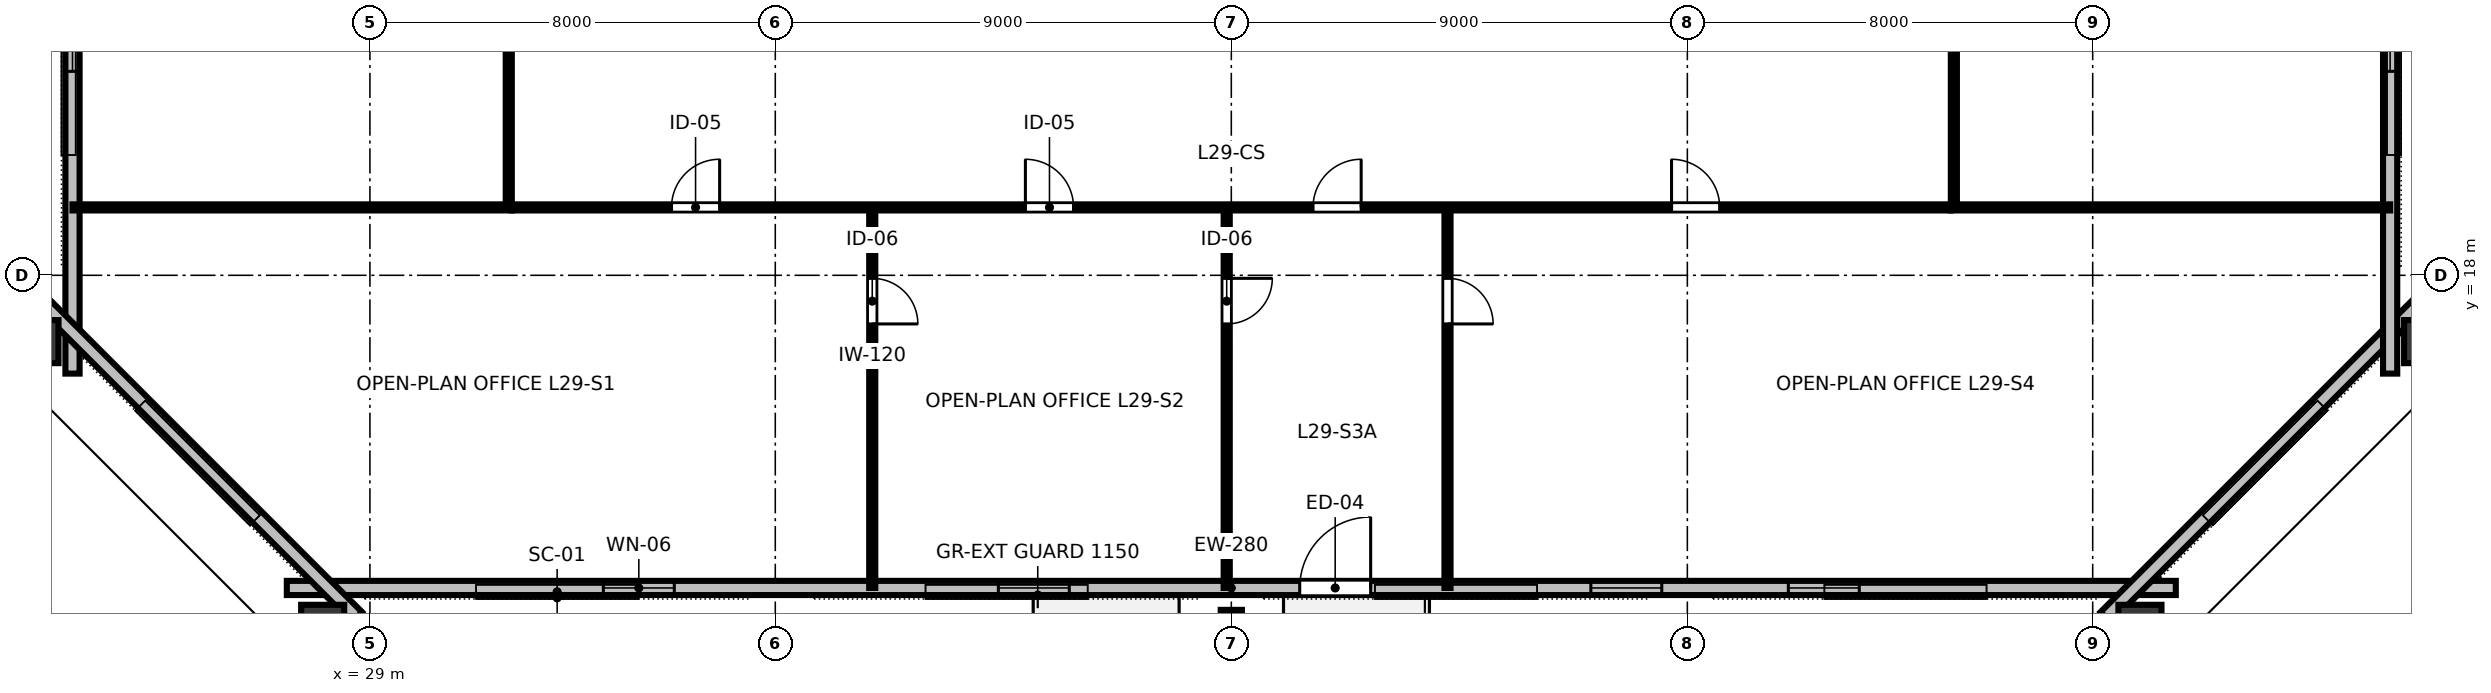
"""IFC4 building model, lengths in metres.
Left out: names, types, materials, properties, quantities, classifications, styles, units other than length and angle.
Written with IfcOpenShell. Run it as: python <this file> out.ifc"""

import sys

from ifc_helpers import new_model, si_unit, direction, frame, frame_2d, origin, origin_2d, place, context, subcontext, project, spatial, rectangle, hollow_rectangle, i_section, extrude, element, fill, save


model = new_model("IFC4")
c1 = context("Model", 3, precision=1e-05, world=origin(), true_north=direction((0.0, 1.0)))
c2 = subcontext(c1, "Body", "Model", "MODEL_VIEW")
j1 = project(units=[si_unit("LENGTHUNIT", "METRE"), si_unit("PLANEANGLEUNIT", "RADIAN")], contexts=[c1])
p1 = place(None, origin())
s1 = spatial("IfcSite", under=j1, at=p1, CompositionType="ELEMENT")
p2 = place(p1, origin())
s2 = spatial("IfcBuilding", under=s1, at=p2, CompositionType="ELEMENT")
p3 = place(p2, frame((0.0, 0.0, 113.2)))
s3 = spatial("IfcBuildingStorey", under=s2, at=p3, CompositionType="ELEMENT", Elevation=113.2)
p4 = place(p3, frame((28.067, 10.998, 0.0), z_axis=(0.227500403072, 0.158558770333, 0.960782328601), x_axis=(-0.571787524267, 0.820401747373, 0.0)))
e1 = element("IfcColumn", 1, at=p4, inside=s3, PredefinedType="COLUMN", context=c2, shape_type="SweptSolid", body=[
    extrude(hollow_rectangle(XDim=0.85, YDim=1.0, WallThickness=0.05, at=origin_2d()), origin(), (0.0, 0.0, 1.0), 3.495),
])
p5 = place(p3, frame((46.0, 11.17, 0.0), z_axis=(0.0, 0.161641018094, 0.986849624446), x_axis=(-1.0, 0.0, 0.0)))
e2 = element("IfcColumn", 2, at=p5, inside=s3, PredefinedType="COLUMN", context=c2, shape_type="SweptSolid", body=[
    extrude(i_section(OverallWidth=0.418, OverallDepth=0.455, WebThickness=0.042, FlangeThickness=0.068, FilletRadius=0.025, at=origin_2d()), origin(), (0.0, 0.0, 1.0), 3.403),
])
p6 = place(p3, frame((63.933, 10.998, 0.0), z_axis=(-0.227500403072, 0.158558770333, 0.960782328601), x_axis=(-0.571787524267, -0.820401747373, 0.0)))
e3 = element("IfcColumn", 3, at=p6, inside=s3, PredefinedType="COLUMN", context=c2, shape_type="SweptSolid", body=[
    extrude(hollow_rectangle(XDim=0.85, YDim=1.0, WallThickness=0.05, at=origin_2d()), origin(), (0.0, 0.0, 1.0), 3.495),
])
for number, where, z_axis, x_axis in (
    (4, (69.646, 16.691, 0.0), (-0.187, 0.199, 0.962), (0.659, -0.701, 0.273)),
    (5, (22.354, 16.691, 0.0), (0.187, 0.199, 0.962), (-0.659, -0.701, 0.273)),
):
    element("IfcColumn", number, at=place(p3, frame(where, z_axis=z_axis, x_axis=x_axis)), inside=s3, PredefinedType="COLUMN", context=c2, shape_type="SweptSolid", body=[
        extrude(hollow_rectangle(XDim=0.85, YDim=1.0, WallThickness=0.05, at=origin_2d()), origin(), (0.0, 0.0, 1.0), 3.491),
    ])
p7 = place(p3, frame((27.36, 11.83, 0.0), z_axis=(0.0, 0.0, 1.0), x_axis=(1.0, 0.0, 0.0)))
e6 = element("IfcWall", 6, at=p7, inside=s3, PredefinedType="STANDARD", context=c2, shape_type="SweptSolid", body=[
    extrude(rectangle(XDim=37.28, YDim=0.28, at=frame_2d((18.64, 0.0))), origin(), (0.0, 0.0, 1.0), 2.662),
])
p8 = place(p7, frame((19.99, 0.0, 0.0)))
e7 = element("IfcOpeningElement", 7, at=p8, cuts=e6, PredefinedType="OPENING", context=c2, shape_type="SweptSolid", body=[
    extrude(rectangle(XDim=1.4, YDim=2.15, at=frame_2d((0.7, 1.075))), frame((0.0, 0.15, 0.0), z_axis=(0.0, -1.0, 0.0), x_axis=(1.0, 0.0, 0.0)), (0.0, 0.0, 1.0), 0.3),
])
p9 = place(p7, frame((6.247, 0.0, 0.85)))
e8 = element("IfcOpeningElement", 8, at=p9, cuts=e6, PredefinedType="OPENING", context=c2, shape_type="SweptSolid", body=[
    extrude(rectangle(XDim=1.4, YDim=1.2, at=frame_2d((0.7, 0.6))), frame((0.0, 0.15, 0.0), z_axis=(0.0, -1.0, 0.0), x_axis=(1.0, 0.0, 0.0)), (0.0, 0.0, 1.0), 0.3),
])
p10 = place(p7, frame((14.042, 0.0, 0.85)))
e9 = element("IfcOpeningElement", 9, at=p10, cuts=e6, PredefinedType="OPENING", context=c2, shape_type="SweptSolid", body=[
    extrude(rectangle(XDim=1.4, YDim=1.2, at=frame_2d((0.7, 0.6))), frame((0.0, 0.15, 0.0), z_axis=(0.0, -1.0, 0.0), x_axis=(1.0, 0.0, 0.0)), (0.0, 0.0, 1.0), 0.3),
])
p11 = place(p7, frame((25.736, 0.0, 0.85)))
e10 = element("IfcOpeningElement", 10, at=p11, cuts=e6, PredefinedType="OPENING", context=c2, shape_type="SweptSolid", body=[
    extrude(rectangle(XDim=1.4, YDim=1.2, at=frame_2d((0.7, 0.6))), frame((0.0, 0.15, 0.0), z_axis=(0.0, -1.0, 0.0), x_axis=(1.0, 0.0, 0.0)), (0.0, 0.0, 1.0), 0.3),
])
p12 = place(p7, frame((29.633, 0.0, 0.85)))
e11 = element("IfcOpeningElement", 11, at=p12, cuts=e6, PredefinedType="OPENING", context=c2, shape_type="SweptSolid", body=[
    extrude(rectangle(XDim=1.4, YDim=1.2, at=frame_2d((0.7, 0.6))), frame((0.0, 0.15, 0.0), z_axis=(0.0, -1.0, 0.0), x_axis=(1.0, 0.0, 0.0)), (0.0, 0.0, 1.0), 0.3),
])
p13 = place(p3, frame((63.254, 11.256, 0.0), z_axis=(0.0, 0.0, 1.0), x_axis=(0.707106781187, 0.707106781187, 0.0)))
e12 = element("IfcWall", 12, at=p13, inside=s3, PredefinedType="STANDARD", context=c2, shape_type="SweptSolid", body=[
    extrude(rectangle(XDim=8.753, YDim=0.28, at=frame_2d((4.376, 0.0))), origin(), (0.0, 0.0, 1.0), 2.662),
])
p14 = place(p3, frame((68.87, 16.06, 0.0), z_axis=(0.0, 0.0, 1.0), x_axis=(0.0, 1.0, 0.0)))
e13 = element("IfcWall", 13, at=p14, inside=s3, PredefinedType="STANDARD", context=c2, shape_type="SweptSolid", body=[
    extrude(rectangle(XDim=31.88, YDim=0.28, at=frame_2d((15.94, 0.0))), origin(), (0.0, 0.0, 1.0), 2.662),
])
p15 = place(p14, frame((5.965, 0.0, 0.85)))
e14 = element("IfcOpeningElement", 14, at=p15, cuts=e13, PredefinedType="OPENING", context=c2, shape_type="SweptSolid", body=[
    extrude(rectangle(XDim=1.4, YDim=1.2, at=frame_2d((0.7, 0.6))), frame((0.0, 0.15, 0.0), z_axis=(0.0, -1.0, 0.0), x_axis=(1.0, 0.0, 0.0)), (0.0, 0.0, 1.0), 0.3),
])
p16 = place(p14, frame((9.675, 0.0, 0.85)))
e15 = element("IfcOpeningElement", 15, at=p16, cuts=e13, PredefinedType="OPENING", context=c2, shape_type="SweptSolid", body=[
    extrude(rectangle(XDim=1.4, YDim=1.2, at=frame_2d((0.7, 0.6))), frame((0.0, 0.15, 0.0), z_axis=(0.0, -1.0, 0.0), x_axis=(1.0, 0.0, 0.0)), (0.0, 0.0, 1.0), 0.3),
])
p17 = place(p14, frame((13.385, 0.0, 0.85)))
e16 = element("IfcOpeningElement", 16, at=p17, cuts=e13, PredefinedType="OPENING", context=c2, shape_type="SweptSolid", body=[
    extrude(rectangle(XDim=1.4, YDim=1.2, at=frame_2d((0.7, 0.6))), frame((0.0, 0.15, 0.0), z_axis=(0.0, -1.0, 0.0), x_axis=(1.0, 0.0, 0.0)), (0.0, 0.0, 1.0), 0.3),
])
p18 = place(p14, frame((20.805, 0.0, 0.85)))
e17 = element("IfcOpeningElement", 17, at=p18, cuts=e13, PredefinedType="OPENING", context=c2, shape_type="SweptSolid", body=[
    extrude(rectangle(XDim=1.4, YDim=1.2, at=frame_2d((0.7, 0.6))), frame((0.0, 0.15, 0.0), z_axis=(0.0, -1.0, 0.0), x_axis=(1.0, 0.0, 0.0)), (0.0, 0.0, 1.0), 0.3),
])
p19 = place(p14, frame((24.515, 0.0, 0.85)))
e18 = element("IfcOpeningElement", 18, at=p19, cuts=e13, PredefinedType="OPENING", context=c2, shape_type="SweptSolid", body=[
    extrude(rectangle(XDim=1.4, YDim=1.2, at=frame_2d((0.7, 0.6))), frame((0.0, 0.15, 0.0), z_axis=(0.0, -1.0, 0.0), x_axis=(1.0, 0.0, 0.0)), (0.0, 0.0, 1.0), 0.3),
])
p20 = place(p3, frame((23.13, 47.94, 0.0), z_axis=(0.0, 0.0, 1.0), x_axis=(0.0, -1.0, 0.0)))
e19 = element("IfcWall", 19, at=p20, inside=s3, PredefinedType="STANDARD", context=c2, shape_type="SweptSolid", body=[
    extrude(rectangle(XDim=31.88, YDim=0.28, at=frame_2d((15.94, 0.0))), origin(), (0.0, 0.0, 1.0), 2.662),
])
p21 = place(p20, frame((5.965, 0.0, 0.85)))
e20 = element("IfcOpeningElement", 20, at=p21, cuts=e19, PredefinedType="OPENING", context=c2, shape_type="SweptSolid", body=[
    extrude(rectangle(XDim=1.4, YDim=1.2, at=frame_2d((0.7, 0.6))), frame((0.0, 0.15, 0.0), z_axis=(0.0, -1.0, 0.0), x_axis=(1.0, 0.0, 0.0)), (0.0, 0.0, 1.0), 0.3),
])
p22 = place(p20, frame((9.675, 0.0, 0.85)))
e21 = element("IfcOpeningElement", 21, at=p22, cuts=e19, PredefinedType="OPENING", context=c2, shape_type="SweptSolid", body=[
    extrude(rectangle(XDim=1.4, YDim=1.2, at=frame_2d((0.7, 0.6))), frame((0.0, 0.15, 0.0), z_axis=(0.0, -1.0, 0.0), x_axis=(1.0, 0.0, 0.0)), (0.0, 0.0, 1.0), 0.3),
])
p23 = place(p20, frame((13.385, 0.0, 0.85)))
e22 = element("IfcOpeningElement", 22, at=p23, cuts=e19, PredefinedType="OPENING", context=c2, shape_type="SweptSolid", body=[
    extrude(rectangle(XDim=1.4, YDim=1.2, at=frame_2d((0.7, 0.6))), frame((0.0, 0.15, 0.0), z_axis=(0.0, -1.0, 0.0), x_axis=(1.0, 0.0, 0.0)), (0.0, 0.0, 1.0), 0.3),
])
p24 = place(p20, frame((17.095, 0.0, 0.85)))
e23 = element("IfcOpeningElement", 23, at=p24, cuts=e19, PredefinedType="OPENING", context=c2, shape_type="SweptSolid", body=[
    extrude(rectangle(XDim=1.4, YDim=1.2, at=frame_2d((0.7, 0.6))), frame((0.0, 0.15, 0.0), z_axis=(0.0, -1.0, 0.0), x_axis=(1.0, 0.0, 0.0)), (0.0, 0.0, 1.0), 0.3),
])
p25 = place(p20, frame((20.805, 0.0, 0.85)))
e24 = element("IfcOpeningElement", 24, at=p25, cuts=e19, PredefinedType="OPENING", context=c2, shape_type="SweptSolid", body=[
    extrude(rectangle(XDim=1.4, YDim=1.2, at=frame_2d((0.7, 0.6))), frame((0.0, 0.15, 0.0), z_axis=(0.0, -1.0, 0.0), x_axis=(1.0, 0.0, 0.0)), (0.0, 0.0, 1.0), 0.3),
])
p26 = place(p20, frame((24.515, 0.0, 0.85)))
e25 = element("IfcOpeningElement", 25, at=p26, cuts=e19, PredefinedType="OPENING", context=c2, shape_type="SweptSolid", body=[
    extrude(rectangle(XDim=1.4, YDim=1.2, at=frame_2d((0.7, 0.6))), frame((0.0, 0.15, 0.0), z_axis=(0.0, -1.0, 0.0), x_axis=(1.0, 0.0, 0.0)), (0.0, 0.0, 1.0), 0.3),
])
p27 = place(p3, frame((22.556, 17.446, 0.0), z_axis=(0.0, 0.0, 1.0), x_axis=(0.707106781187, -0.707106781187, 0.0)))
e26 = element("IfcWall", 26, at=p27, inside=s3, PredefinedType="STANDARD", context=c2, shape_type="SweptSolid", body=[
    extrude(rectangle(XDim=8.753, YDim=0.28, at=frame_2d((4.376, 0.0))), origin(), (0.0, 0.0, 1.0), 2.662),
])
p28 = place(p3, frame((38.914, 19.34, 0.0), z_axis=(0.0, 0.0, 1.0), x_axis=(0.0, -1.0, 0.0)))
e27 = element("IfcWall", 27, at=p28, inside=s3, PredefinedType="PARTITIONING", context=c2, shape_type="SweptSolid", body=[
    extrude(rectangle(XDim=7.51, YDim=0.12, at=frame_2d((3.755, 0.0))), origin(), (0.0, 0.0, 1.0), 2.64),
])
p29 = place(p28, frame((1.4, 0.0, 0.0)))
e28 = element("IfcOpeningElement", 28, at=p29, cuts=e27, PredefinedType="OPENING", context=c2, shape_type="SweptSolid", body=[
    extrude(rectangle(XDim=0.9, YDim=2.15, at=frame_2d((0.45, 1.075))), frame((0.0, 0.07, 0.0), z_axis=(0.0, -1.0, 0.0), x_axis=(1.0, 0.0, 0.0)), (0.0, 0.0, 1.0), 0.14),
])
p30 = place(p3, frame((45.909, 19.34, 0.0), z_axis=(0.0, 0.0, 1.0), x_axis=(0.0, -1.0, 0.0)))
e29 = element("IfcWall", 29, at=p30, inside=s3, PredefinedType="PARTITIONING", context=c2, shape_type="SweptSolid", body=[
    extrude(rectangle(XDim=7.51, YDim=0.12, at=frame_2d((3.755, 0.0))), origin(), (0.0, 0.0, 1.0), 2.64),
])
p31 = place(p30, frame((1.4, 0.0, 0.0)))
e30 = element("IfcOpeningElement", 30, at=p31, cuts=e29, PredefinedType="OPENING", context=c2, shape_type="SweptSolid", body=[
    extrude(rectangle(XDim=0.9, YDim=2.15, at=frame_2d((0.45, 1.075))), frame((0.0, 0.07, 0.0), z_axis=(0.0, -1.0, 0.0), x_axis=(1.0, 0.0, 0.0)), (0.0, 0.0, 1.0), 0.14),
])
p32 = place(p3, frame((50.267, 19.34, 0.0), z_axis=(0.0, 0.0, 1.0), x_axis=(0.0, -1.0, 0.0)))
e31 = element("IfcWall", 31, at=p32, inside=s3, PredefinedType="PARTITIONING", context=c2, shape_type="SweptSolid", body=[
    extrude(rectangle(XDim=7.51, YDim=0.12, at=frame_2d((3.755, 0.0))), origin(), (0.0, 0.0, 1.0), 2.64),
])
p33 = place(p32, frame((1.4, 0.0, 0.0)))
e32 = element("IfcOpeningElement", 32, at=p33, cuts=e31, PredefinedType="OPENING", context=c2, shape_type="SweptSolid", body=[
    extrude(rectangle(XDim=0.9, YDim=2.15, at=frame_2d((0.45, 1.075))), frame((0.0, 0.07, 0.0), z_axis=(0.0, -1.0, 0.0), x_axis=(1.0, 0.0, 0.0)), (0.0, 0.0, 1.0), 0.14),
])
p34 = place(p3, frame((31.8, 19.34, 0.0), z_axis=(0.0, 0.0, 1.0), x_axis=(1.0, 0.0, 0.0)))
e33 = element("IfcWall", 33, at=p34, inside=s3, PredefinedType="PARTITIONING", context=c2, shape_type="SweptSolid", body=[
    extrude(rectangle(XDim=28.4, YDim=0.12, at=frame_2d((14.2, 0.0))), origin(), (0.0, 0.0, 1.0), 2.64),
])
p35 = place(p34, frame((3.152, 0.0, 0.0)))
e34 = element("IfcOpeningElement", 34, at=p35, cuts=e33, PredefinedType="OPENING", context=c2, shape_type="SweptSolid", body=[
    extrude(rectangle(XDim=0.95, YDim=2.15, at=frame_2d((0.475, 1.075))), frame((0.0, 0.07, 0.0), z_axis=(0.0, -1.0, 0.0), x_axis=(1.0, 0.0, 0.0)), (0.0, 0.0, 1.0), 0.14),
])
p36 = place(p34, frame((10.136, 0.0, 0.0)))
e35 = element("IfcOpeningElement", 35, at=p36, cuts=e33, PredefinedType="OPENING", context=c2, shape_type="SweptSolid", body=[
    extrude(rectangle(XDim=0.95, YDim=2.15, at=frame_2d((0.475, 1.075))), frame((0.0, 0.07, 0.0), z_axis=(0.0, -1.0, 0.0), x_axis=(1.0, 0.0, 0.0)), (0.0, 0.0, 1.0), 0.14),
])
p37 = place(p34, frame((15.813, 0.0, 0.0)))
e36 = element("IfcOpeningElement", 36, at=p37, cuts=e33, PredefinedType="OPENING", context=c2, shape_type="SweptSolid", body=[
    extrude(rectangle(XDim=0.95, YDim=2.15, at=frame_2d((0.475, 1.075))), frame((0.0, 0.07, 0.0), z_axis=(0.0, -1.0, 0.0), x_axis=(1.0, 0.0, 0.0)), (0.0, 0.0, 1.0), 0.14),
])
p38 = place(p34, frame((22.888, 0.0, 0.0)))
e37 = element("IfcOpeningElement", 37, at=p38, cuts=e33, PredefinedType="OPENING", context=c2, shape_type="SweptSolid", body=[
    extrude(rectangle(XDim=0.95, YDim=2.15, at=frame_2d((0.475, 1.075))), frame((0.0, 0.07, 0.0), z_axis=(0.0, -1.0, 0.0), x_axis=(1.0, 0.0, 0.0)), (0.0, 0.0, 1.0), 0.14),
])
p39 = place(p3, frame((31.74, 19.4, 0.0), z_axis=(0.0, 0.0, 1.0), x_axis=(0.0, 1.0, 0.0)))
e38 = element("IfcWall", 38, at=p39, inside=s3, PredefinedType="PARTITIONING", context=c2, shape_type="SweptSolid", body=[
    extrude(rectangle(XDim=11.58, YDim=0.12, at=frame_2d((5.79, 0.0))), origin(), (0.0, 0.0, 1.0), 2.64),
])
p40 = place(p39, frame((5.415, 0.0, 0.0)))
e39 = element("IfcOpeningElement", 39, at=p40, cuts=e38, PredefinedType="OPENING", context=c2, shape_type="SweptSolid", body=[
    extrude(rectangle(XDim=0.95, YDim=2.15, at=frame_2d((0.475, 1.075))), frame((0.0, 0.07, 0.0), z_axis=(0.0, -1.0, 0.0), x_axis=(1.0, 0.0, 0.0)), (0.0, 0.0, 1.0), 0.14),
])
p41 = place(p3, frame((60.26, 19.4, 0.0), z_axis=(0.0, 0.0, 1.0), x_axis=(0.0, 1.0, 0.0)))
e40 = element("IfcWall", 40, at=p41, inside=s3, PredefinedType="PARTITIONING", context=c2, shape_type="SweptSolid", body=[
    extrude(rectangle(XDim=11.58, YDim=0.12, at=frame_2d((5.79, 0.0))), origin(), (0.0, 0.0, 1.0), 2.64),
])
p42 = place(p41, frame((5.415, 0.0, 0.0)))
e41 = element("IfcOpeningElement", 41, at=p42, cuts=e40, PredefinedType="OPENING", context=c2, shape_type="SweptSolid", body=[
    extrude(rectangle(XDim=0.95, YDim=2.15, at=frame_2d((0.475, 1.075))), frame((0.0, 0.07, 0.0), z_axis=(0.0, -1.0, 0.0), x_axis=(1.0, 0.0, 0.0)), (0.0, 0.0, 1.0), 0.14),
])
for number, where, z_axis, x_axis in (
    (42, (31.8, 19.34, 0.0), (0.0, 0.0, 1.0), (-1.0, 0.0, 0.0)),
    (43, (60.2, 19.34, 0.0), (0.0, 0.0, 1.0), (1.0, 0.0, 0.0)),
):
    element("IfcWall", number, at=place(p3, frame(where, z_axis=z_axis, x_axis=x_axis)), inside=s3, PredefinedType="PARTITIONING", context=c2, shape_type="SweptSolid", body=[
        extrude(rectangle(XDim=8.67, YDim=0.12, at=frame_2d((4.335, 0.0))), origin(), (0.0, 0.0, 1.0), 2.64),
    ])
p43 = place(p8, origin())
e44 = element("IfcDoor", 44, at=p43, inside=s3, OperationType="SINGLE_SWING_RIGHT", PredefinedType="DOOR", context=c2, shape_type="SweptSolid", body=[
    extrude(rectangle(XDim=1.4, YDim=2.15, at=frame_2d((0.7, 1.075))), frame((0.0, 0.025, 0.0), z_axis=(0.0, -1.0, 0.0), x_axis=(1.0, 0.0, 0.0)), (0.0, 0.0, 1.0), 0.05),
])
fill(e7, e44)
p44 = place(p9, origin())
e45 = element("IfcWindow", 45, at=p44, inside=s3, PartitioningType="SINGLE_PANEL", PredefinedType="WINDOW", context=c2, shape_type="SweptSolid", body=[
    extrude(rectangle(XDim=1.4, YDim=1.2, at=frame_2d((0.7, 0.6))), frame((0.0, 0.03, 0.0), z_axis=(0.0, -1.0, 0.0), x_axis=(1.0, 0.0, 0.0)), (0.0, 0.0, 1.0), 0.06),
])
fill(e8, e45)
p45 = place(p10, origin())
e46 = element("IfcWindow", 46, at=p45, inside=s3, PartitioningType="SINGLE_PANEL", PredefinedType="WINDOW", context=c2, shape_type="SweptSolid", body=[
    extrude(rectangle(XDim=1.4, YDim=1.2, at=frame_2d((0.7, 0.6))), frame((0.0, 0.03, 0.0), z_axis=(0.0, -1.0, 0.0), x_axis=(1.0, 0.0, 0.0)), (0.0, 0.0, 1.0), 0.06),
])
fill(e9, e46)
p46 = place(p11, origin())
e47 = element("IfcWindow", 47, at=p46, inside=s3, PartitioningType="SINGLE_PANEL", PredefinedType="WINDOW", context=c2, shape_type="SweptSolid", body=[
    extrude(rectangle(XDim=1.4, YDim=1.2, at=frame_2d((0.7, 0.6))), frame((0.0, 0.03, 0.0), z_axis=(0.0, -1.0, 0.0), x_axis=(1.0, 0.0, 0.0)), (0.0, 0.0, 1.0), 0.06),
])
fill(e10, e47)
p47 = place(p12, origin())
e48 = element("IfcWindow", 48, at=p47, inside=s3, PartitioningType="SINGLE_PANEL", PredefinedType="WINDOW", context=c2, shape_type="SweptSolid", body=[
    extrude(rectangle(XDim=1.4, YDim=1.2, at=frame_2d((0.7, 0.6))), frame((0.0, 0.03, 0.0), z_axis=(0.0, -1.0, 0.0), x_axis=(1.0, 0.0, 0.0)), (0.0, 0.0, 1.0), 0.06),
])
fill(e11, e48)
p48 = place(p15, origin())
e49 = element("IfcWindow", 49, at=p48, inside=s3, PartitioningType="SINGLE_PANEL", PredefinedType="WINDOW", context=c2, shape_type="SweptSolid", body=[
    extrude(rectangle(XDim=1.4, YDim=1.2, at=frame_2d((0.7, 0.6))), frame((0.0, 0.03, 0.0), z_axis=(0.0, -1.0, 0.0), x_axis=(1.0, 0.0, 0.0)), (0.0, 0.0, 1.0), 0.06),
])
fill(e14, e49)
p49 = place(p26, origin())
e50 = element("IfcWindow", 50, at=p49, inside=s3, PartitioningType="SINGLE_PANEL", PredefinedType="WINDOW", context=c2, shape_type="SweptSolid", body=[
    extrude(rectangle(XDim=1.4, YDim=1.2, at=frame_2d((0.7, 0.6))), frame((0.0, 0.03, 0.0), z_axis=(0.0, -1.0, 0.0), x_axis=(1.0, 0.0, 0.0)), (0.0, 0.0, 1.0), 0.06),
])
fill(e25, e50)
p50 = place(p29, origin())
e51 = element("IfcDoor", 51, at=p50, inside=s3, OperationType="SINGLE_SWING_RIGHT", PredefinedType="DOOR", context=c2, shape_type="SweptSolid", body=[
    extrude(rectangle(XDim=0.9, YDim=2.15, at=frame_2d((0.45, 1.075))), frame((0.0, 0.025, 0.0), z_axis=(0.0, -1.0, 0.0), x_axis=(1.0, 0.0, 0.0)), (0.0, 0.0, 1.0), 0.05),
])
fill(e28, e51)
p51 = place(p31, origin())
e52 = element("IfcDoor", 52, at=p51, inside=s3, OperationType="SINGLE_SWING_LEFT", PredefinedType="DOOR", context=c2, shape_type="SweptSolid", body=[
    extrude(rectangle(XDim=0.9, YDim=2.15, at=frame_2d((0.45, 1.075))), frame((0.0, 0.025, 0.0), z_axis=(0.0, -1.0, 0.0), x_axis=(1.0, 0.0, 0.0)), (0.0, 0.0, 1.0), 0.05),
])
fill(e30, e52)
p52 = place(p33, origin())
e53 = element("IfcDoor", 53, at=p52, inside=s3, OperationType="SINGLE_SWING_RIGHT", PredefinedType="DOOR", context=c2, shape_type="SweptSolid", body=[
    extrude(rectangle(XDim=0.9, YDim=2.15, at=frame_2d((0.45, 1.075))), frame((0.0, 0.025, 0.0), z_axis=(0.0, -1.0, 0.0), x_axis=(1.0, 0.0, 0.0)), (0.0, 0.0, 1.0), 0.05),
])
fill(e32, e53)
p53 = place(p35, origin())
e54 = element("IfcDoor", 54, at=p53, inside=s3, OperationType="SINGLE_SWING_RIGHT", PredefinedType="DOOR", context=c2, shape_type="SweptSolid", body=[
    extrude(rectangle(XDim=0.95, YDim=2.15, at=frame_2d((0.475, 1.075))), frame((0.0, 0.025, 0.0), z_axis=(0.0, -1.0, 0.0), x_axis=(1.0, 0.0, 0.0)), (0.0, 0.0, 1.0), 0.05),
])
fill(e34, e54)
p54 = place(p36, origin())
e55 = element("IfcDoor", 55, at=p54, inside=s3, OperationType="SINGLE_SWING_LEFT", PredefinedType="DOOR", context=c2, shape_type="SweptSolid", body=[
    extrude(rectangle(XDim=0.95, YDim=2.15, at=frame_2d((0.475, 1.075))), frame((0.0, 0.025, 0.0), z_axis=(0.0, -1.0, 0.0), x_axis=(1.0, 0.0, 0.0)), (0.0, 0.0, 1.0), 0.05),
])
fill(e35, e55)
p55 = place(p37, origin())
e56 = element("IfcDoor", 56, at=p55, inside=s3, OperationType="SINGLE_SWING_RIGHT", PredefinedType="DOOR", context=c2, shape_type="SweptSolid", body=[
    extrude(rectangle(XDim=0.95, YDim=2.15, at=frame_2d((0.475, 1.075))), frame((0.0, 0.025, 0.0), z_axis=(0.0, -1.0, 0.0), x_axis=(1.0, 0.0, 0.0)), (0.0, 0.0, 1.0), 0.05),
])
fill(e36, e56)
p56 = place(p38, origin())
e57 = element("IfcDoor", 57, at=p56, inside=s3, OperationType="SINGLE_SWING_LEFT", PredefinedType="DOOR", context=c2, shape_type="SweptSolid", body=[
    extrude(rectangle(XDim=0.95, YDim=2.15, at=frame_2d((0.475, 1.075))), frame((0.0, 0.025, 0.0), z_axis=(0.0, -1.0, 0.0), x_axis=(1.0, 0.0, 0.0)), (0.0, 0.0, 1.0), 0.05),
])
fill(e37, e57)
save(model, sys.argv[1])
